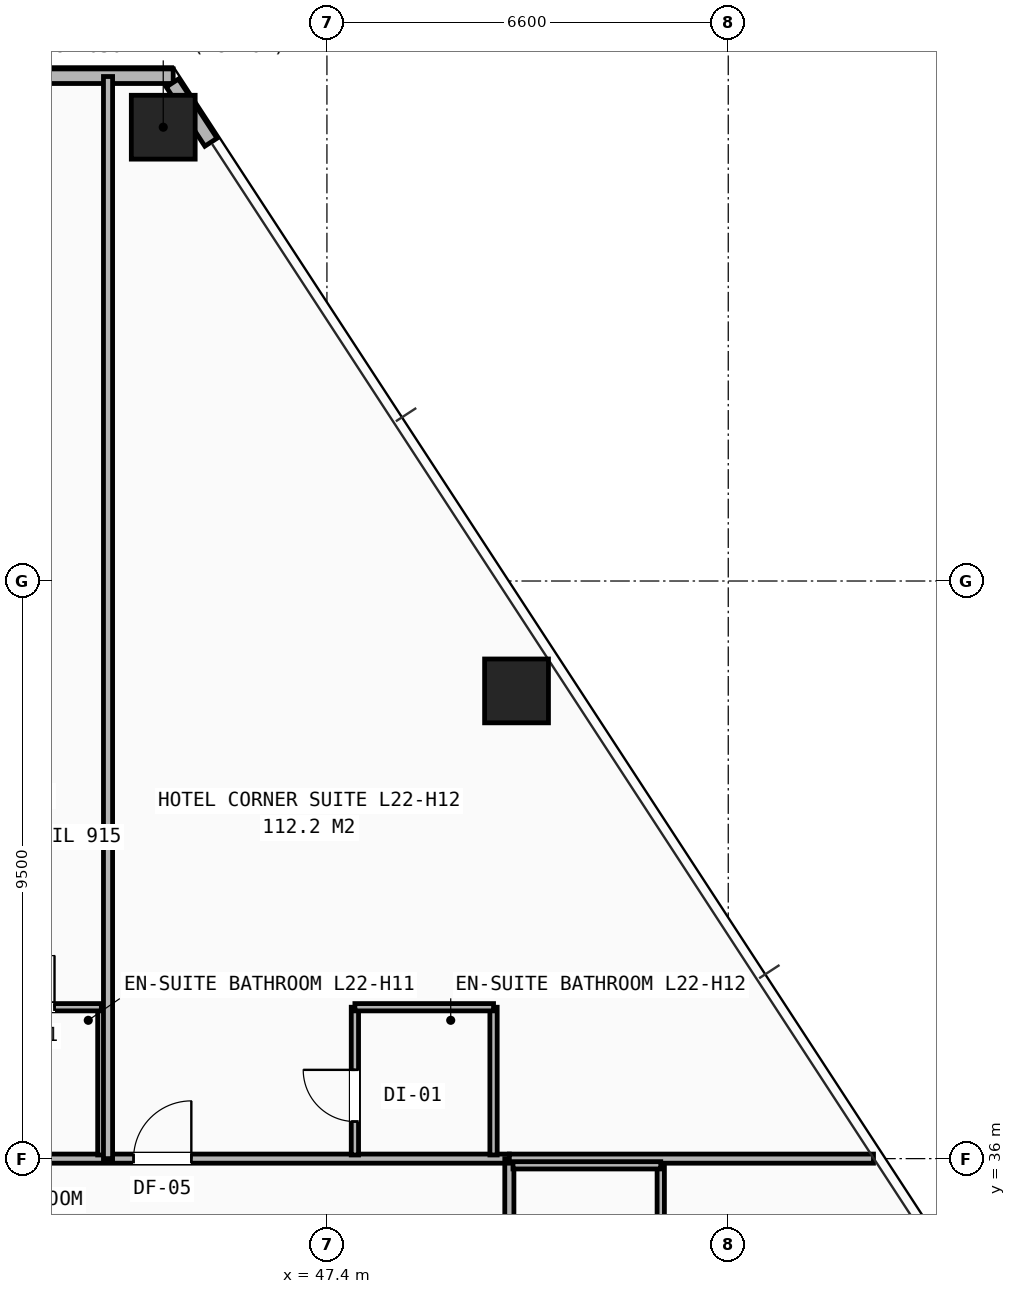
"""IFC4 building model, lengths in metres.
Left out: names, types, materials, properties, quantities, classifications, styles, units other than length and angle.
Written with IfcOpenShell. Run it as: python <this file> out.ifc"""

import sys

from ifc_helpers import new_model, si_unit, direction, frame, frame_2d, origin, origin_2d, place, context, subcontext, project, spatial, rectangle, hollow_rectangle, extrude, element, fill, save


model = new_model("IFC4")
c1 = context("Model", 3, precision=1e-05, world=origin(), true_north=direction((0.0, 1.0)))
c2 = subcontext(c1, "Body", "Model", "MODEL_VIEW")
j1 = project(units=[si_unit("LENGTHUNIT", "METRE"), si_unit("PLANEANGLEUNIT", "RADIAN")], contexts=[c1])
p1 = place(None, origin())
s1 = spatial("IfcSite", under=j1, at=p1, CompositionType="ELEMENT")
p2 = place(p1, origin())
s2 = spatial("IfcBuilding", under=s1, at=p2, CompositionType="ELEMENT")
p3 = place(p2, frame((0.0, 0.0, 79.8)))
s3 = spatial("IfcBuildingStorey", under=s2, at=p3, CompositionType="ELEMENT", Elevation=79.8)
for number, where, z_axis, x_axis in (
    (1, (44.708, 52.964, 0.0), (0.0, 0.0, 1.0), (1.0, 0.0, 0.0)),
    (2, (50.518, 43.692, 0.0), (0.0, 0.0, 1.0), (1.0, 0.0, 0.0)),
):
    element("IfcColumn", number, at=place(p3, frame(where, z_axis=z_axis, x_axis=x_axis)), inside=s3, PredefinedType="COLUMN", context=c2, shape_type="SweptSolid", body=[
        extrude(hollow_rectangle(XDim=1.05, YDim=1.05, WallThickness=0.07, at=origin_2d()), origin(), (0.0, 0.0, 1.0), 3.2),
    ])
p4 = place(p3, frame((35.128, 53.802, 0.0), z_axis=(0.0, 0.0, 1.0), x_axis=(1.0, 0.0, 0.0)))
e3 = element("IfcWall", 3, at=p4, inside=s3, PredefinedType="SHEAR", context=c2, shape_type="SweptSolid", body=[
    extrude(rectangle(XDim=9.743, YDim=0.24, at=frame_2d((4.872, 0.0))), origin(), (0.0, 0.0, 1.0), 2.253),
])
p5 = place(p3, frame((45.493, 52.717, 0.0), z_axis=(0.0, 0.0, 1.0), x_axis=(-0.546287000619, 0.837598061695, 0.0)))
e4 = element("IfcWall", 4, at=p5, inside=s3, PredefinedType="SHEAR", context=c2, shape_type="SweptSolid", body=[
    extrude(rectangle(XDim=1.162, YDim=0.24, at=frame_2d((0.581, 0.0))), origin(), (0.0, 0.0, 1.0), 2.253),
])
p6 = place(p3, frame((40.75, 36.0, 0.0), z_axis=(0.0, 0.0, 1.0), x_axis=(1.0, 0.0, 0.0)))
e5 = element("IfcWall", 5, at=p6, inside=s3, PredefinedType="PARTITIONING", context=c2, shape_type="SweptSolid", body=[
    extrude(rectangle(XDim=9.65, YDim=0.15, at=frame_2d((4.825, 0.0))), origin(), (0.0, 0.0, 1.0), 2.503),
])
p7 = place(p6, frame((3.47, 0.0, 0.0)))
e6 = element("IfcOpeningElement", 6, at=p7, cuts=e5, PredefinedType="OPENING", context=c2, shape_type="SweptSolid", body=[
    extrude(rectangle(XDim=0.95, YDim=2.1, at=frame_2d((0.475, 1.05))), frame((0.0, 0.085, 0.0), z_axis=(0.0, -1.0, 0.0), x_axis=(1.0, 0.0, 0.0)), (0.0, 0.0, 1.0), 0.17),
])
p8 = place(p3, frame((50.4, 14.1, 0.0), z_axis=(0.0, 0.0, 1.0), x_axis=(0.0, 1.0, 0.0)))
e7 = element("IfcWall", 7, at=p8, inside=s3, PredefinedType="PARTITIONING", context=c2, shape_type="SweptSolid", body=[
    extrude(rectangle(XDim=21.9, YDim=0.15, at=frame_2d((10.95, 0.0))), origin(), (0.0, 0.0, 1.0), 2.181),
])
p9 = place(p8, frame((0.42, 0.0, 0.0)))
e8 = element("IfcOpeningElement", 8, at=p9, cuts=e7, PredefinedType="OPENING", context=c2, shape_type="SweptSolid", body=[
    extrude(rectangle(XDim=0.95, YDim=2.1, at=frame_2d((0.475, 1.05))), frame((0.0, 0.085, 0.0), z_axis=(0.0, -1.0, 0.0), x_axis=(1.0, 0.0, 0.0)), (0.0, 0.0, 1.0), 0.17),
])
p10 = place(p8, frame((11.82, 0.0, 0.0)))
e9 = element("IfcOpeningElement", 9, at=p10, cuts=e7, PredefinedType="OPENING", context=c2, shape_type="SweptSolid", body=[
    extrude(rectangle(XDim=0.95, YDim=2.1, at=frame_2d((0.475, 1.05))), frame((0.0, 0.085, 0.0), z_axis=(0.0, -1.0, 0.0), x_axis=(1.0, 0.0, 0.0)), (0.0, 0.0, 1.0), 0.17),
])
p11 = place(p3, frame((50.4, 36.0, 0.0), z_axis=(0.0, 0.0, 1.0), x_axis=(1.0, 0.0, 0.0)))
e10 = element("IfcWall", 10, at=p11, inside=s3, PredefinedType="PARTITIONING", context=c2, shape_type="SweptSolid", body=[
    extrude(rectangle(XDim=5.989, YDim=0.15, at=frame_2d((2.994, 0.0))), origin(), (0.0, 0.0, 1.0), 2.258),
])
p12 = place(p3, frame((52.89, 33.61, 0.0), z_axis=(0.0, 0.0, 1.0), x_axis=(0.0, 1.0, 0.0)))
e11 = element("IfcWall", 11, at=p12, inside=s3, PredefinedType="PARTITIONING", context=c2, shape_type="SweptSolid", body=[
    extrude(rectangle(XDim=2.28, YDim=0.12, at=frame_2d((1.14, 0.0))), origin(), (0.0, 0.0, 1.0), 2.97),
])
for number, where, z_axis, x_axis in (
    (12, (50.46, 35.89, 0.0), (0.0, 0.0, 1.0), (1.0, 0.0, 0.0)),
    (13, (43.69, 36.06, 0.0), (0.0, 0.0, 1.0), (0.0, 1.0, 0.0)),
):
    element("IfcWall", number, at=place(p3, frame(where, z_axis=z_axis, x_axis=x_axis)), inside=s3, PredefinedType="PARTITIONING", context=c2, shape_type="SweptSolid", body=[
        extrude(rectangle(XDim=2.43, YDim=0.12, at=frame_2d((1.215, 0.0))), origin(), (0.0, 0.0, 1.0), 2.97),
    ])
p13 = place(p3, frame((41.95, 38.49, 0.0), z_axis=(0.0, 0.0, 1.0), x_axis=(1.0, 0.0, 0.0)))
e14 = element("IfcWall", 14, at=p13, inside=s3, PredefinedType="PARTITIONING", context=c2, shape_type="SweptSolid", body=[
    extrude(rectangle(XDim=1.74, YDim=0.12, at=frame_2d((0.87, 0.0))), origin(), (0.0, 0.0, 1.0), 2.97),
])
p14 = place(p13, frame((0.12, 0.0, 0.0)))
e15 = element("IfcOpeningElement", 15, at=p14, cuts=e14, PredefinedType="OPENING", context=c2, shape_type="SweptSolid", body=[
    extrude(rectangle(XDim=0.85, YDim=2.05, at=frame_2d((0.425, 1.025))), frame((0.0, 0.07, 0.0), z_axis=(0.0, -1.0, 0.0), x_axis=(1.0, 0.0, 0.0)), (0.0, 0.0, 1.0), 0.14),
])
p15 = place(p3, frame((43.8, 36.0, 0.0), z_axis=(0.0, 0.0, 1.0), x_axis=(0.0, 1.0, 0.0)))
e16 = element("IfcWall", 16, at=p15, inside=s3, PredefinedType="PARTITIONING", context=c2, shape_type="SweptSolid", body=[
    extrude(rectangle(XDim=17.797, YDim=0.15, at=frame_2d((8.899, 0.0))), origin(), (0.0, 0.0, 1.0), 2.181),
])
p16 = place(p3, frame((47.86, 36.06, 0.0), z_axis=(0.0, 0.0, 1.0), x_axis=(0.0, 1.0, 0.0)))
e17 = element("IfcWall", 17, at=p16, inside=s3, PredefinedType="PARTITIONING", context=c2, shape_type="SweptSolid", body=[
    extrude(rectangle(XDim=2.43, YDim=0.12, at=frame_2d((1.215, 0.0))), origin(), (0.0, 0.0, 1.0), 2.503),
])
p17 = place(p16, frame((0.55, 0.0, 0.0)))
e18 = element("IfcOpeningElement", 18, at=p17, cuts=e17, PredefinedType="OPENING", context=c2, shape_type="SweptSolid", body=[
    extrude(rectangle(XDim=0.85, YDim=2.05, at=frame_2d((0.425, 1.025))), frame((0.0, 0.07, 0.0), z_axis=(0.0, -1.0, 0.0), x_axis=(1.0, 0.0, 0.0)), (0.0, 0.0, 1.0), 0.14),
])
p18 = place(p3, frame((50.14, 36.06, 0.0), z_axis=(0.0, 0.0, 1.0), x_axis=(0.0, 1.0, 0.0)))
e19 = element("IfcWall", 19, at=p18, inside=s3, PredefinedType="PARTITIONING", context=c2, shape_type="SweptSolid", body=[
    extrude(rectangle(XDim=2.43, YDim=0.12, at=frame_2d((1.215, 0.0))), origin(), (0.0, 0.0, 1.0), 2.503),
])
p19 = place(p3, frame((47.86, 38.49, 0.0), z_axis=(0.0, 0.0, 1.0), x_axis=(1.0, 0.0, 0.0)))
e20 = element("IfcWall", 20, at=p19, inside=s3, PredefinedType="PARTITIONING", context=c2, shape_type="SweptSolid", body=[
    extrude(rectangle(XDim=2.28, YDim=0.12, at=frame_2d((1.14, 0.0))), origin(), (0.0, 0.0, 1.0), 2.503),
])
p20 = place(p14, origin())
e21 = element("IfcDoor", 21, at=p20, inside=s3, OperationType="SINGLE_SWING_RIGHT", PredefinedType="DOOR", context=c2, shape_type="SweptSolid", body=[
    extrude(rectangle(XDim=0.85, YDim=2.05, at=frame_2d((0.425, 1.025))), frame((0.0, 0.025, 0.0), z_axis=(0.0, -1.0, 0.0), x_axis=(1.0, 0.0, 0.0)), (0.0, 0.0, 1.0), 0.05),
])
fill(e15, e21)
p21 = place(p7, origin())
e22 = element("IfcDoor", 22, at=p21, inside=s3, OperationType="SINGLE_SWING_RIGHT", PredefinedType="DOOR", context=c2, shape_type="SweptSolid", body=[
    extrude(rectangle(XDim=0.95, YDim=2.1, at=frame_2d((0.475, 1.05))), frame((0.0, 0.025, 0.0), z_axis=(0.0, -1.0, 0.0), x_axis=(1.0, 0.0, 0.0)), (0.0, 0.0, 1.0), 0.05),
])
fill(e6, e22)
p22 = place(p17, origin())
e23 = element("IfcDoor", 23, at=p22, inside=s3, OperationType="SINGLE_SWING_RIGHT", PredefinedType="DOOR", context=c2, shape_type="SweptSolid", body=[
    extrude(rectangle(XDim=0.85, YDim=2.05, at=frame_2d((0.425, 1.025))), frame((0.0, 0.025, 0.0), z_axis=(0.0, -1.0, 0.0), x_axis=(1.0, 0.0, 0.0)), (0.0, 0.0, 1.0), 0.05),
])
fill(e18, e23)
save(model, sys.argv[1])
